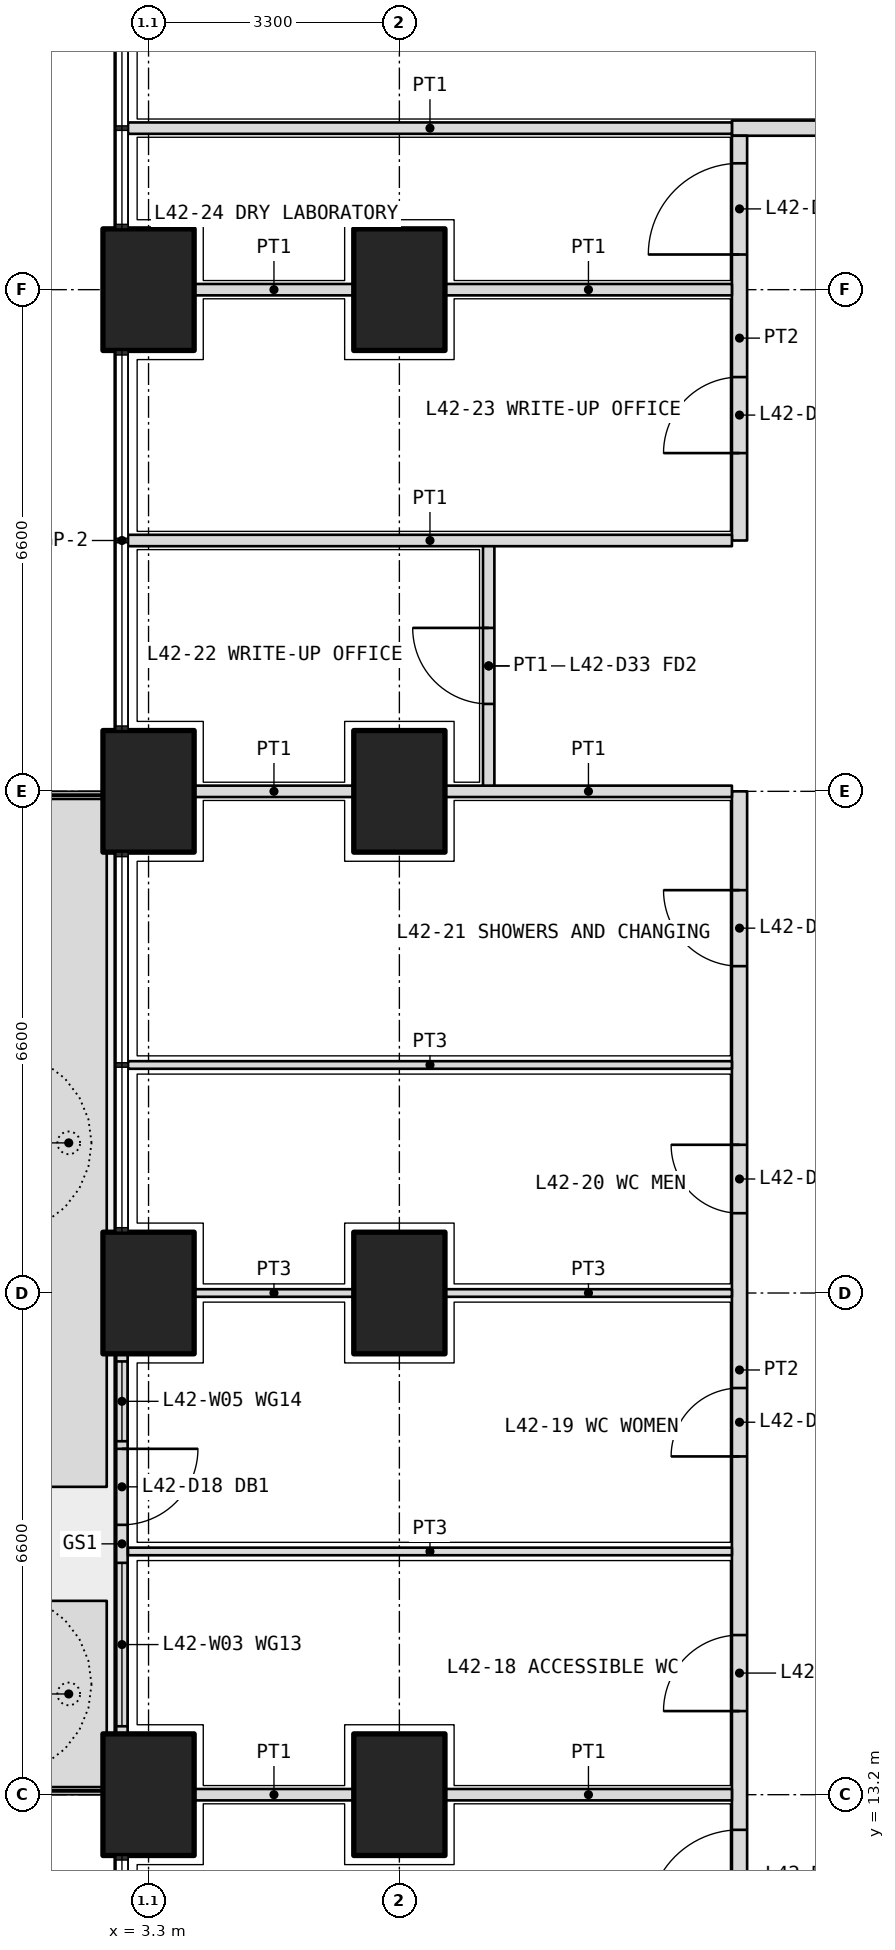
"""IFC4 building model, lengths in metres.
Left out: names, types, materials, properties, quantities, classifications, styles, units other than length and angle.
Written with IfcOpenShell. Run it as: python <this file> out.ifc"""

import sys

from ifc_helpers import new_model, si_unit, direction, frame, frame_2d, origin, origin_2d, place, context, subcontext, project, spatial, polyline, rectangle, outline, extrude, element, fill, save


model = new_model("IFC4")
c1 = context("Model", 3, precision=1e-05, world=origin(), true_north=direction((0.0, 1.0)))
c2 = subcontext(c1, "Body", "Model", "MODEL_VIEW")
j1 = project(units=[si_unit("LENGTHUNIT", "METRE"), si_unit("PLANEANGLEUNIT", "RADIAN")], contexts=[c1])
p1 = place(None, origin())
s1 = spatial("IfcSite", under=j1, at=p1, CompositionType="ELEMENT")
p2 = place(p1, origin())
s2 = spatial("IfcBuilding", under=s1, at=p2, CompositionType="ELEMENT")
p3 = place(p2, frame((0.0, 0.0, 185.1)))
s3 = spatial("IfcBuildingStorey", under=s2, at=p3, CompositionType="ELEMENT", Elevation=185.1)
for number, where, z_axis, x_axis in (
    (1, (3.3, 13.2, 0.0), (0.0, 0.0, 1.0), (0.0, 1.0, 0.0)),
    (2, (3.3, 19.8, 0.0), (0.0, 0.0, 1.0), (0.0, 1.0, 0.0)),
    (3, (3.3, 26.4, 0.0), (0.0, 0.0, 1.0), (0.0, 1.0, 0.0)),
    (4, (3.3, 33.0, 0.0), (0.0, 0.0, 1.0), (0.0, 1.0, 0.0)),
    (5, (6.6, 13.2, 0.0), (0.0, 0.0, 1.0), (0.0, 1.0, 0.0)),
    (6, (6.6, 19.8, 0.0), (0.0, 0.0, 1.0), (0.0, 1.0, 0.0)),
    (7, (6.6, 26.4, 0.0), (0.0, 0.0, 1.0), (0.0, 1.0, 0.0)),
    (8, (6.6, 33.0, 0.0), (0.0, 0.0, 1.0), (0.0, 1.0, 0.0)),
):
    element("IfcColumn", number, at=place(p3, frame(where, z_axis=z_axis, x_axis=x_axis)), inside=s3, PredefinedType="COLUMN", context=c2, shape_type="SweptSolid", body=[
        extrude(rectangle(XDim=1.6, YDim=1.2, at=origin_2d()), origin(), (0.0, 0.0, 1.0), 4.2),
    ])
p4 = place(p3, origin())
e9 = element("IfcWall", 9, at=p4, inside=s3, PredefinedType="USERDEFINED", context=c2, shape_type="SweptSolid", body=[
    extrude(outline(polyline([(1.75, 13.3), (2.75, 13.3), (2.75, 15.75), (1.75, 15.75), (1.75, 13.3)]), holes=[polyline([(1.9, 13.45), (2.6, 13.45), (2.6, 15.6), (1.9, 15.6), (1.9, 13.45)])]), origin(), (0.0, 0.0, 1.0), 1.05),
])
p5 = place(p3, origin())
e10 = element("IfcWall", 10, at=p5, inside=s3, PredefinedType="USERDEFINED", context=c2, shape_type="SweptSolid", body=[
    extrude(outline(polyline([(1.75, 17.25), (2.75, 17.25), (2.75, 26.3), (1.75, 26.3), (1.75, 17.25)]), holes=[polyline([(1.9, 17.4), (2.6, 17.4), (2.6, 26.15), (1.9, 26.15), (1.9, 17.4)])]), origin(), (0.0, 0.0, 1.0), 1.05),
])
p6 = place(p3, frame((2.95, 19.0, 0.0), z_axis=(0.0, 0.0, 1.0), x_axis=(0.0, -1.0, 0.0)))
e11 = element("IfcWall", 11, at=p6, inside=s3, PredefinedType="SOLIDWALL", context=c2, shape_type="SweptSolid", body=[
    extrude(rectangle(XDim=5.0, YDim=0.15, at=frame_2d((2.5, 0.0))), origin(), (0.0, 0.0, 1.0), 2.7),
])
p7 = place(p6, frame((1.25, 0.0, 0.0)))
e12 = element("IfcOpeningElement", 12, at=p7, cuts=e11, PredefinedType="OPENING", context=c2, shape_type="SweptSolid", body=[
    extrude(rectangle(XDim=1.0, YDim=2.4, at=frame_2d((0.5, 1.2))), frame((0.0, 0.085, 0.0), z_axis=(0.0, -1.0, 0.0), x_axis=(1.0, 0.0, 0.0)), (0.0, 0.0, 1.0), 0.17),
])
p8 = place(p6, frame((0.1, 0.0, 0.1)))
e13 = element("IfcOpeningElement", 13, at=p8, cuts=e11, PredefinedType="OPENING", context=c2, shape_type="SweptSolid", body=[
    extrude(rectangle(XDim=1.05, YDim=2.3, at=frame_2d((0.525, 1.15))), frame((0.0, 0.085, 0.0), z_axis=(0.0, -1.0, 0.0), x_axis=(1.0, 0.0, 0.0)), (0.0, 0.0, 1.0), 0.17),
])
p9 = place(p6, frame((2.75, 0.0, 0.1)))
e14 = element("IfcOpeningElement", 14, at=p9, cuts=e11, PredefinedType="OPENING", context=c2, shape_type="SweptSolid", body=[
    extrude(rectangle(XDim=2.15, YDim=2.3, at=frame_2d((1.075, 1.15))), frame((0.0, 0.085, 0.0), z_axis=(0.0, -1.0, 0.0), x_axis=(1.0, 0.0, 0.0)), (0.0, 0.0, 1.0), 0.17),
])
p10 = place(p3, frame((10.975, 35.125, 0.0), z_axis=(0.0, 0.0, 1.0), x_axis=(1.0, 0.0, 0.0)))
e15 = element("IfcWall", 15, at=p10, inside=s3, PredefinedType="PARTITIONING", context=c2, shape_type="SweptSolid", body=[
    extrude(rectangle(XDim=30.85, YDim=0.2, at=frame_2d((15.425, 0.0))), origin(), (0.0, 0.0, 1.0), 2.85),
])
p11 = place(p10, frame((7.262, 0.0, 0.0)))
e16 = element("IfcOpeningElement", 16, at=p11, cuts=e15, PredefinedType="OPENING", context=c2, shape_type="SweptSolid", body=[
    extrude(rectangle(XDim=1.0, YDim=2.1, at=frame_2d((0.5, 1.05))), frame((0.0, 0.11, 0.0), z_axis=(0.0, -1.0, 0.0), x_axis=(1.0, 0.0, 0.0)), (0.0, 0.0, 1.0), 0.22),
])
p12 = place(p10, frame((17.025, 0.0, 0.0)))
e17 = element("IfcOpeningElement", 17, at=p12, cuts=e15, PredefinedType="OPENING", context=c2, shape_type="SweptSolid", body=[
    extrude(rectangle(XDim=1.0, YDim=2.1, at=frame_2d((0.5, 1.05))), frame((0.0, 0.11, 0.0), z_axis=(0.0, -1.0, 0.0), x_axis=(1.0, 0.0, 0.0)), (0.0, 0.0, 1.0), 0.22),
])
p13 = place(p10, frame((20.325, 0.0, 0.0)))
e18 = element("IfcOpeningElement", 18, at=p13, cuts=e15, PredefinedType="OPENING", context=c2, shape_type="SweptSolid", body=[
    extrude(rectangle(XDim=1.0, YDim=2.1, at=frame_2d((0.5, 1.05))), frame((0.0, 0.11, 0.0), z_axis=(0.0, -1.0, 0.0), x_axis=(1.0, 0.0, 0.0)), (0.0, 0.0, 1.0), 0.22),
])
p14 = place(p10, frame((24.725, 0.0, 0.0)))
e19 = element("IfcOpeningElement", 19, at=p14, cuts=e15, PredefinedType="OPENING", context=c2, shape_type="SweptSolid", body=[
    extrude(rectangle(XDim=1.2, YDim=2.1, at=frame_2d((0.6, 1.05))), frame((0.0, 0.11, 0.0), z_axis=(0.0, -1.0, 0.0), x_axis=(1.0, 0.0, 0.0)), (0.0, 0.0, 1.0), 0.22),
])
p15 = place(p10, frame((29.188, 0.0, 0.0)))
e20 = element("IfcOpeningElement", 20, at=p15, cuts=e15, PredefinedType="OPENING", context=c2, shape_type="SweptSolid", body=[
    extrude(rectangle(XDim=1.0, YDim=2.1, at=frame_2d((0.5, 1.05))), frame((0.0, 0.11, 0.0), z_axis=(0.0, -1.0, 0.0), x_axis=(1.0, 0.0, 0.0)), (0.0, 0.0, 1.0), 0.22),
])
p16 = place(p3, frame((11.075, 11.175, 0.0), z_axis=(0.0, 0.0, 1.0), x_axis=(0.0, 1.0, 0.0)))
e21 = element("IfcWall", 21, at=p16, inside=s3, PredefinedType="PARTITIONING", context=c2, shape_type="SweptSolid", body=[
    extrude(rectangle(XDim=15.225, YDim=0.2, at=frame_2d((7.612, 0.0))), origin(), (0.0, 0.0, 1.0), 2.85),
])
p17 = place(p16, frame((0.363, 0.0, 0.0)))
e22 = element("IfcOpeningElement", 22, at=p17, cuts=e21, PredefinedType="OPENING", context=c2, shape_type="SweptSolid", body=[
    extrude(rectangle(XDim=1.2, YDim=2.1, at=frame_2d((0.6, 1.05))), frame((0.0, 0.11, 0.0), z_axis=(0.0, -1.0, 0.0), x_axis=(1.0, 0.0, 0.0)), (0.0, 0.0, 1.0), 0.22),
])
p18 = place(p16, frame((3.125, 0.0, 0.0)))
e23 = element("IfcOpeningElement", 23, at=p18, cuts=e21, PredefinedType="OPENING", context=c2, shape_type="SweptSolid", body=[
    extrude(rectangle(XDim=1.0, YDim=2.1, at=frame_2d((0.5, 1.05))), frame((0.0, 0.11, 0.0), z_axis=(0.0, -1.0, 0.0), x_axis=(1.0, 0.0, 0.0)), (0.0, 0.0, 1.0), 0.22),
])
p19 = place(p16, frame((6.475, 0.0, 0.0)))
e24 = element("IfcOpeningElement", 24, at=p19, cuts=e21, PredefinedType="OPENING", context=c2, shape_type="SweptSolid", body=[
    extrude(rectangle(XDim=0.9, YDim=2.1, at=frame_2d((0.45, 1.05))), frame((0.0, 0.11, 0.0), z_axis=(0.0, -1.0, 0.0), x_axis=(1.0, 0.0, 0.0)), (0.0, 0.0, 1.0), 0.22),
])
p20 = place(p16, frame((9.675, 0.0, 0.0)))
e25 = element("IfcOpeningElement", 25, at=p20, cuts=e21, PredefinedType="OPENING", context=c2, shape_type="SweptSolid", body=[
    extrude(rectangle(XDim=0.9, YDim=2.1, at=frame_2d((0.45, 1.05))), frame((0.0, 0.11, 0.0), z_axis=(0.0, -1.0, 0.0), x_axis=(1.0, 0.0, 0.0)), (0.0, 0.0, 1.0), 0.22),
])
p21 = place(p16, frame((12.925, 0.0, 0.0)))
e26 = element("IfcOpeningElement", 26, at=p21, cuts=e21, PredefinedType="OPENING", context=c2, shape_type="SweptSolid", body=[
    extrude(rectangle(XDim=1.0, YDim=2.1, at=frame_2d((0.5, 1.05))), frame((0.0, 0.11, 0.0), z_axis=(0.0, -1.0, 0.0), x_axis=(1.0, 0.0, 0.0)), (0.0, 0.0, 1.0), 0.22),
])
p22 = place(p3, frame((11.075, 29.7, 0.0), z_axis=(0.0, 0.0, 1.0), x_axis=(0.0, 1.0, 0.0)))
e27 = element("IfcWall", 27, at=p22, inside=s3, PredefinedType="PARTITIONING", context=c2, shape_type="SweptSolid", body=[
    extrude(rectangle(XDim=5.325, YDim=0.2, at=frame_2d((2.663, 0.0))), origin(), (0.0, 0.0, 1.0), 2.85),
])
p23 = place(p22, frame((1.15, 0.0, 0.0)))
e28 = element("IfcOpeningElement", 28, at=p23, cuts=e27, PredefinedType="OPENING", context=c2, shape_type="SweptSolid", body=[
    extrude(rectangle(XDim=1.0, YDim=2.1, at=frame_2d((0.5, 1.05))), frame((0.0, 0.11, 0.0), z_axis=(0.0, -1.0, 0.0), x_axis=(1.0, 0.0, 0.0)), (0.0, 0.0, 1.0), 0.22),
])
p24 = place(p22, frame((3.762, 0.0, 0.0)))
e29 = element("IfcOpeningElement", 29, at=p24, cuts=e27, PredefinedType="OPENING", context=c2, shape_type="SweptSolid", body=[
    extrude(rectangle(XDim=1.2, YDim=2.1, at=frame_2d((0.6, 1.05))), frame((0.0, 0.11, 0.0), z_axis=(0.0, -1.0, 0.0), x_axis=(1.0, 0.0, 0.0)), (0.0, 0.0, 1.0), 0.22),
])
p25 = place(p3, frame((3.03, 35.125, 0.0), z_axis=(0.0, 0.0, 1.0), x_axis=(1.0, 0.0, 0.0)))
e30 = element("IfcWall", 30, at=p25, inside=s3, PredefinedType="PARTITIONING", context=c2, shape_type="SweptSolid", body=[
    extrude(rectangle(XDim=7.945, YDim=0.15, at=frame_2d((3.973, 0.0))), origin(), (0.0, 0.0, 1.0), 2.7),
])
p26 = place(p3, frame((3.03, 16.4, 0.0), z_axis=(0.0, 0.0, 1.0), x_axis=(1.0, 0.0, 0.0)))
e31 = element("IfcWall", 31, at=p26, inside=s3, PredefinedType="PARTITIONING", context=c2, shape_type="SweptSolid", body=[
    extrude(rectangle(XDim=7.945, YDim=0.1, at=frame_2d((3.973, 0.0))), origin(), (0.0, 0.0, 1.0), 2.7),
])
p27 = place(p3, frame((3.9, 19.8, 0.0), z_axis=(0.0, 0.0, 1.0), x_axis=(1.0, 0.0, 0.0)))
e32 = element("IfcWall", 32, at=p27, inside=s3, PredefinedType="PARTITIONING", context=c2, shape_type="SweptSolid", body=[
    extrude(rectangle(XDim=2.1, YDim=0.1, at=frame_2d((1.05, 0.0))), origin(), (0.0, 0.0, 1.0), 2.85),
])
p28 = place(p3, frame((7.2, 19.8, 0.0), z_axis=(0.0, 0.0, 1.0), x_axis=(1.0, 0.0, 0.0)))
e33 = element("IfcWall", 33, at=p28, inside=s3, PredefinedType="PARTITIONING", context=c2, shape_type="SweptSolid", body=[
    extrude(rectangle(XDim=3.775, YDim=0.1, at=frame_2d((1.888, 0.0))), origin(), (0.0, 0.0, 1.0), 2.85),
])
p29 = place(p3, frame((3.03, 22.8, 0.0), z_axis=(0.0, 0.0, 1.0), x_axis=(1.0, 0.0, 0.0)))
e34 = element("IfcWall", 34, at=p29, inside=s3, PredefinedType="PARTITIONING", context=c2, shape_type="SweptSolid", body=[
    extrude(rectangle(XDim=7.945, YDim=0.1, at=frame_2d((3.973, 0.0))), origin(), (0.0, 0.0, 1.0), 2.7),
])
p30 = place(p3, frame((7.775, 26.4, 0.0), z_axis=(0.0, 0.0, 1.0), x_axis=(0.0, 1.0, 0.0)))
e35 = element("IfcWall", 35, at=p30, inside=s3, PredefinedType="PARTITIONING", context=c2, shape_type="SweptSolid", body=[
    extrude(rectangle(XDim=3.3, YDim=0.15, at=frame_2d((1.65, 0.0))), origin(), (0.0, 0.0, 1.0), 2.85),
])
p31 = place(p30, frame((1.15, 0.0, 0.0)))
e36 = element("IfcOpeningElement", 36, at=p31, cuts=e35, PredefinedType="OPENING", context=c2, shape_type="SweptSolid", body=[
    extrude(rectangle(XDim=1.0, YDim=2.1, at=frame_2d((0.5, 1.05))), frame((0.0, 0.085, 0.0), z_axis=(0.0, -1.0, 0.0), x_axis=(1.0, 0.0, 0.0)), (0.0, 0.0, 1.0), 0.17),
])
p32 = place(p3, frame((3.9, 13.2, 0.0), z_axis=(0.0, 0.0, 1.0), x_axis=(1.0, 0.0, 0.0)))
e37 = element("IfcWall", 37, at=p32, inside=s3, PredefinedType="PARTITIONING", context=c2, shape_type="SweptSolid", body=[
    extrude(rectangle(XDim=2.1, YDim=0.15, at=frame_2d((1.05, 0.0))), origin(), (0.0, 0.0, 1.0), 2.85),
])
p33 = place(p3, frame((7.2, 13.2, 0.0), z_axis=(0.0, 0.0, 1.0), x_axis=(1.0, 0.0, 0.0)))
e38 = element("IfcWall", 38, at=p33, inside=s3, PredefinedType="PARTITIONING", context=c2, shape_type="SweptSolid", body=[
    extrude(rectangle(XDim=3.775, YDim=0.15, at=frame_2d((1.888, 0.0))), origin(), (0.0, 0.0, 1.0), 2.85),
])
p34 = place(p3, frame((3.9, 26.4, 0.0), z_axis=(0.0, 0.0, 1.0), x_axis=(1.0, 0.0, 0.0)))
e39 = element("IfcWall", 39, at=p34, inside=s3, PredefinedType="PARTITIONING", context=c2, shape_type="SweptSolid", body=[
    extrude(rectangle(XDim=2.1, YDim=0.15, at=frame_2d((1.05, 0.0))), origin(), (0.0, 0.0, 1.0), 2.85),
])
p35 = place(p3, frame((7.2, 26.4, 0.0), z_axis=(0.0, 0.0, 1.0), x_axis=(1.0, 0.0, 0.0)))
e40 = element("IfcWall", 40, at=p35, inside=s3, PredefinedType="PARTITIONING", context=c2, shape_type="SweptSolid", body=[
    extrude(rectangle(XDim=3.775, YDim=0.15, at=frame_2d((1.888, 0.0))), origin(), (0.0, 0.0, 1.0), 2.85),
])
p36 = place(p3, frame((3.03, 29.7, 0.0), z_axis=(0.0, 0.0, 1.0), x_axis=(1.0, 0.0, 0.0)))
e41 = element("IfcWall", 41, at=p36, inside=s3, PredefinedType="PARTITIONING", context=c2, shape_type="SweptSolid", body=[
    extrude(rectangle(XDim=7.945, YDim=0.15, at=frame_2d((3.973, 0.0))), origin(), (0.0, 0.0, 1.0), 2.7),
])
p37 = place(p3, frame((3.9, 33.0, 0.0), z_axis=(0.0, 0.0, 1.0), x_axis=(1.0, 0.0, 0.0)))
e42 = element("IfcWall", 42, at=p37, inside=s3, PredefinedType="PARTITIONING", context=c2, shape_type="SweptSolid", body=[
    extrude(rectangle(XDim=2.1, YDim=0.15, at=frame_2d((1.05, 0.0))), origin(), (0.0, 0.0, 1.0), 2.85),
])
p38 = place(p3, frame((7.2, 33.0, 0.0), z_axis=(0.0, 0.0, 1.0), x_axis=(1.0, 0.0, 0.0)))
e43 = element("IfcWall", 43, at=p38, inside=s3, PredefinedType="PARTITIONING", context=c2, shape_type="SweptSolid", body=[
    extrude(rectangle(XDim=3.775, YDim=0.15, at=frame_2d((1.888, 0.0))), origin(), (0.0, 0.0, 1.0), 2.85),
])
p39 = place(p7, origin())
e44 = element("IfcDoor", 44, at=p39, inside=s3, OperationType="SINGLE_SWING_LEFT", PredefinedType="DOOR", context=c2, shape_type="SweptSolid", body=[
    extrude(rectangle(XDim=1.0, YDim=2.4, at=frame_2d((0.5, 1.2))), frame((0.0, 0.025, 0.0), z_axis=(0.0, -1.0, 0.0), x_axis=(1.0, 0.0, 0.0)), (0.0, 0.0, 1.0), 0.05),
])
fill(e12, e44)
p40 = place(p8, origin())
e45 = element("IfcWindow", 45, at=p40, inside=s3, PartitioningType="SINGLE_PANEL", PredefinedType="WINDOW", context=c2, shape_type="SweptSolid", body=[
    extrude(rectangle(XDim=1.05, YDim=2.3, at=frame_2d((0.525, 1.15))), frame((0.0, 0.03, 0.0), z_axis=(0.0, -1.0, 0.0), x_axis=(1.0, 0.0, 0.0)), (0.0, 0.0, 1.0), 0.06),
])
fill(e13, e45)
p41 = place(p9, origin())
e46 = element("IfcWindow", 46, at=p41, inside=s3, PartitioningType="SINGLE_PANEL", PredefinedType="WINDOW", context=c2, shape_type="SweptSolid", body=[
    extrude(rectangle(XDim=2.15, YDim=2.3, at=frame_2d((1.075, 1.15))), frame((0.0, 0.03, 0.0), z_axis=(0.0, -1.0, 0.0), x_axis=(1.0, 0.0, 0.0)), (0.0, 0.0, 1.0), 0.06),
])
fill(e14, e46)
p42 = place(p17, origin())
e47 = element("IfcDoor", 47, at=p42, inside=s3, OperationType="DOUBLE_DOOR_SINGLE_SWING", PredefinedType="DOOR", context=c2, shape_type="SweptSolid", body=[
    extrude(rectangle(XDim=1.2, YDim=2.1, at=frame_2d((0.6, 1.05))), frame((0.0, 0.025, 0.0), z_axis=(0.0, -1.0, 0.0), x_axis=(1.0, 0.0, 0.0)), (0.0, 0.0, 1.0), 0.05),
])
fill(e22, e47)
p43 = place(p18, origin())
e48 = element("IfcDoor", 48, at=p43, inside=s3, OperationType="SINGLE_SWING_LEFT", PredefinedType="DOOR", context=c2, shape_type="SweptSolid", body=[
    extrude(rectangle(XDim=1.0, YDim=2.1, at=frame_2d((0.5, 1.05))), frame((0.0, 0.025, 0.0), z_axis=(0.0, -1.0, 0.0), x_axis=(1.0, 0.0, 0.0)), (0.0, 0.0, 1.0), 0.05),
])
fill(e23, e48)
p44 = place(p19, origin())
e49 = element("IfcDoor", 49, at=p44, inside=s3, OperationType="SINGLE_SWING_LEFT", PredefinedType="DOOR", context=c2, shape_type="SweptSolid", body=[
    extrude(rectangle(XDim=0.9, YDim=2.1, at=frame_2d((0.45, 1.05))), frame((0.0, 0.025, 0.0), z_axis=(0.0, -1.0, 0.0), x_axis=(1.0, 0.0, 0.0)), (0.0, 0.0, 1.0), 0.05),
])
fill(e24, e49)
p45 = place(p20, origin())
e50 = element("IfcDoor", 50, at=p45, inside=s3, OperationType="SINGLE_SWING_RIGHT", PredefinedType="DOOR", context=c2, shape_type="SweptSolid", body=[
    extrude(rectangle(XDim=0.9, YDim=2.1, at=frame_2d((0.45, 1.05))), frame((0.0, 0.025, 0.0), z_axis=(0.0, -1.0, 0.0), x_axis=(1.0, 0.0, 0.0)), (0.0, 0.0, 1.0), 0.05),
])
fill(e25, e50)
p46 = place(p21, origin())
e51 = element("IfcDoor", 51, at=p46, inside=s3, OperationType="SINGLE_SWING_RIGHT", PredefinedType="DOOR", context=c2, shape_type="SweptSolid", body=[
    extrude(rectangle(XDim=1.0, YDim=2.1, at=frame_2d((0.5, 1.05))), frame((0.0, 0.025, 0.0), z_axis=(0.0, -1.0, 0.0), x_axis=(1.0, 0.0, 0.0)), (0.0, 0.0, 1.0), 0.05),
])
fill(e26, e51)
p47 = place(p31, origin())
e52 = element("IfcDoor", 52, at=p47, inside=s3, OperationType="SINGLE_SWING_RIGHT", PredefinedType="DOOR", context=c2, shape_type="SweptSolid", body=[
    extrude(rectangle(XDim=1.0, YDim=2.1, at=frame_2d((0.5, 1.05))), frame((0.0, 0.025, 0.0), z_axis=(0.0, -1.0, 0.0), x_axis=(1.0, 0.0, 0.0)), (0.0, 0.0, 1.0), 0.05),
])
fill(e36, e52)
p48 = place(p23, origin())
e53 = element("IfcDoor", 53, at=p48, inside=s3, OperationType="SINGLE_SWING_LEFT", PredefinedType="DOOR", context=c2, shape_type="SweptSolid", body=[
    extrude(rectangle(XDim=1.0, YDim=2.1, at=frame_2d((0.5, 1.05))), frame((0.0, 0.025, 0.0), z_axis=(0.0, -1.0, 0.0), x_axis=(1.0, 0.0, 0.0)), (0.0, 0.0, 1.0), 0.05),
])
fill(e28, e53)
p49 = place(p24, origin())
e54 = element("IfcDoor", 54, at=p49, inside=s3, OperationType="DOUBLE_DOOR_SINGLE_SWING", PredefinedType="DOOR", context=c2, shape_type="SweptSolid", body=[
    extrude(rectangle(XDim=1.2, YDim=2.1, at=frame_2d((0.6, 1.05))), frame((0.0, 0.025, 0.0), z_axis=(0.0, -1.0, 0.0), x_axis=(1.0, 0.0, 0.0)), (0.0, 0.0, 1.0), 0.05),
])
fill(e29, e54)
save(model, sys.argv[1])
